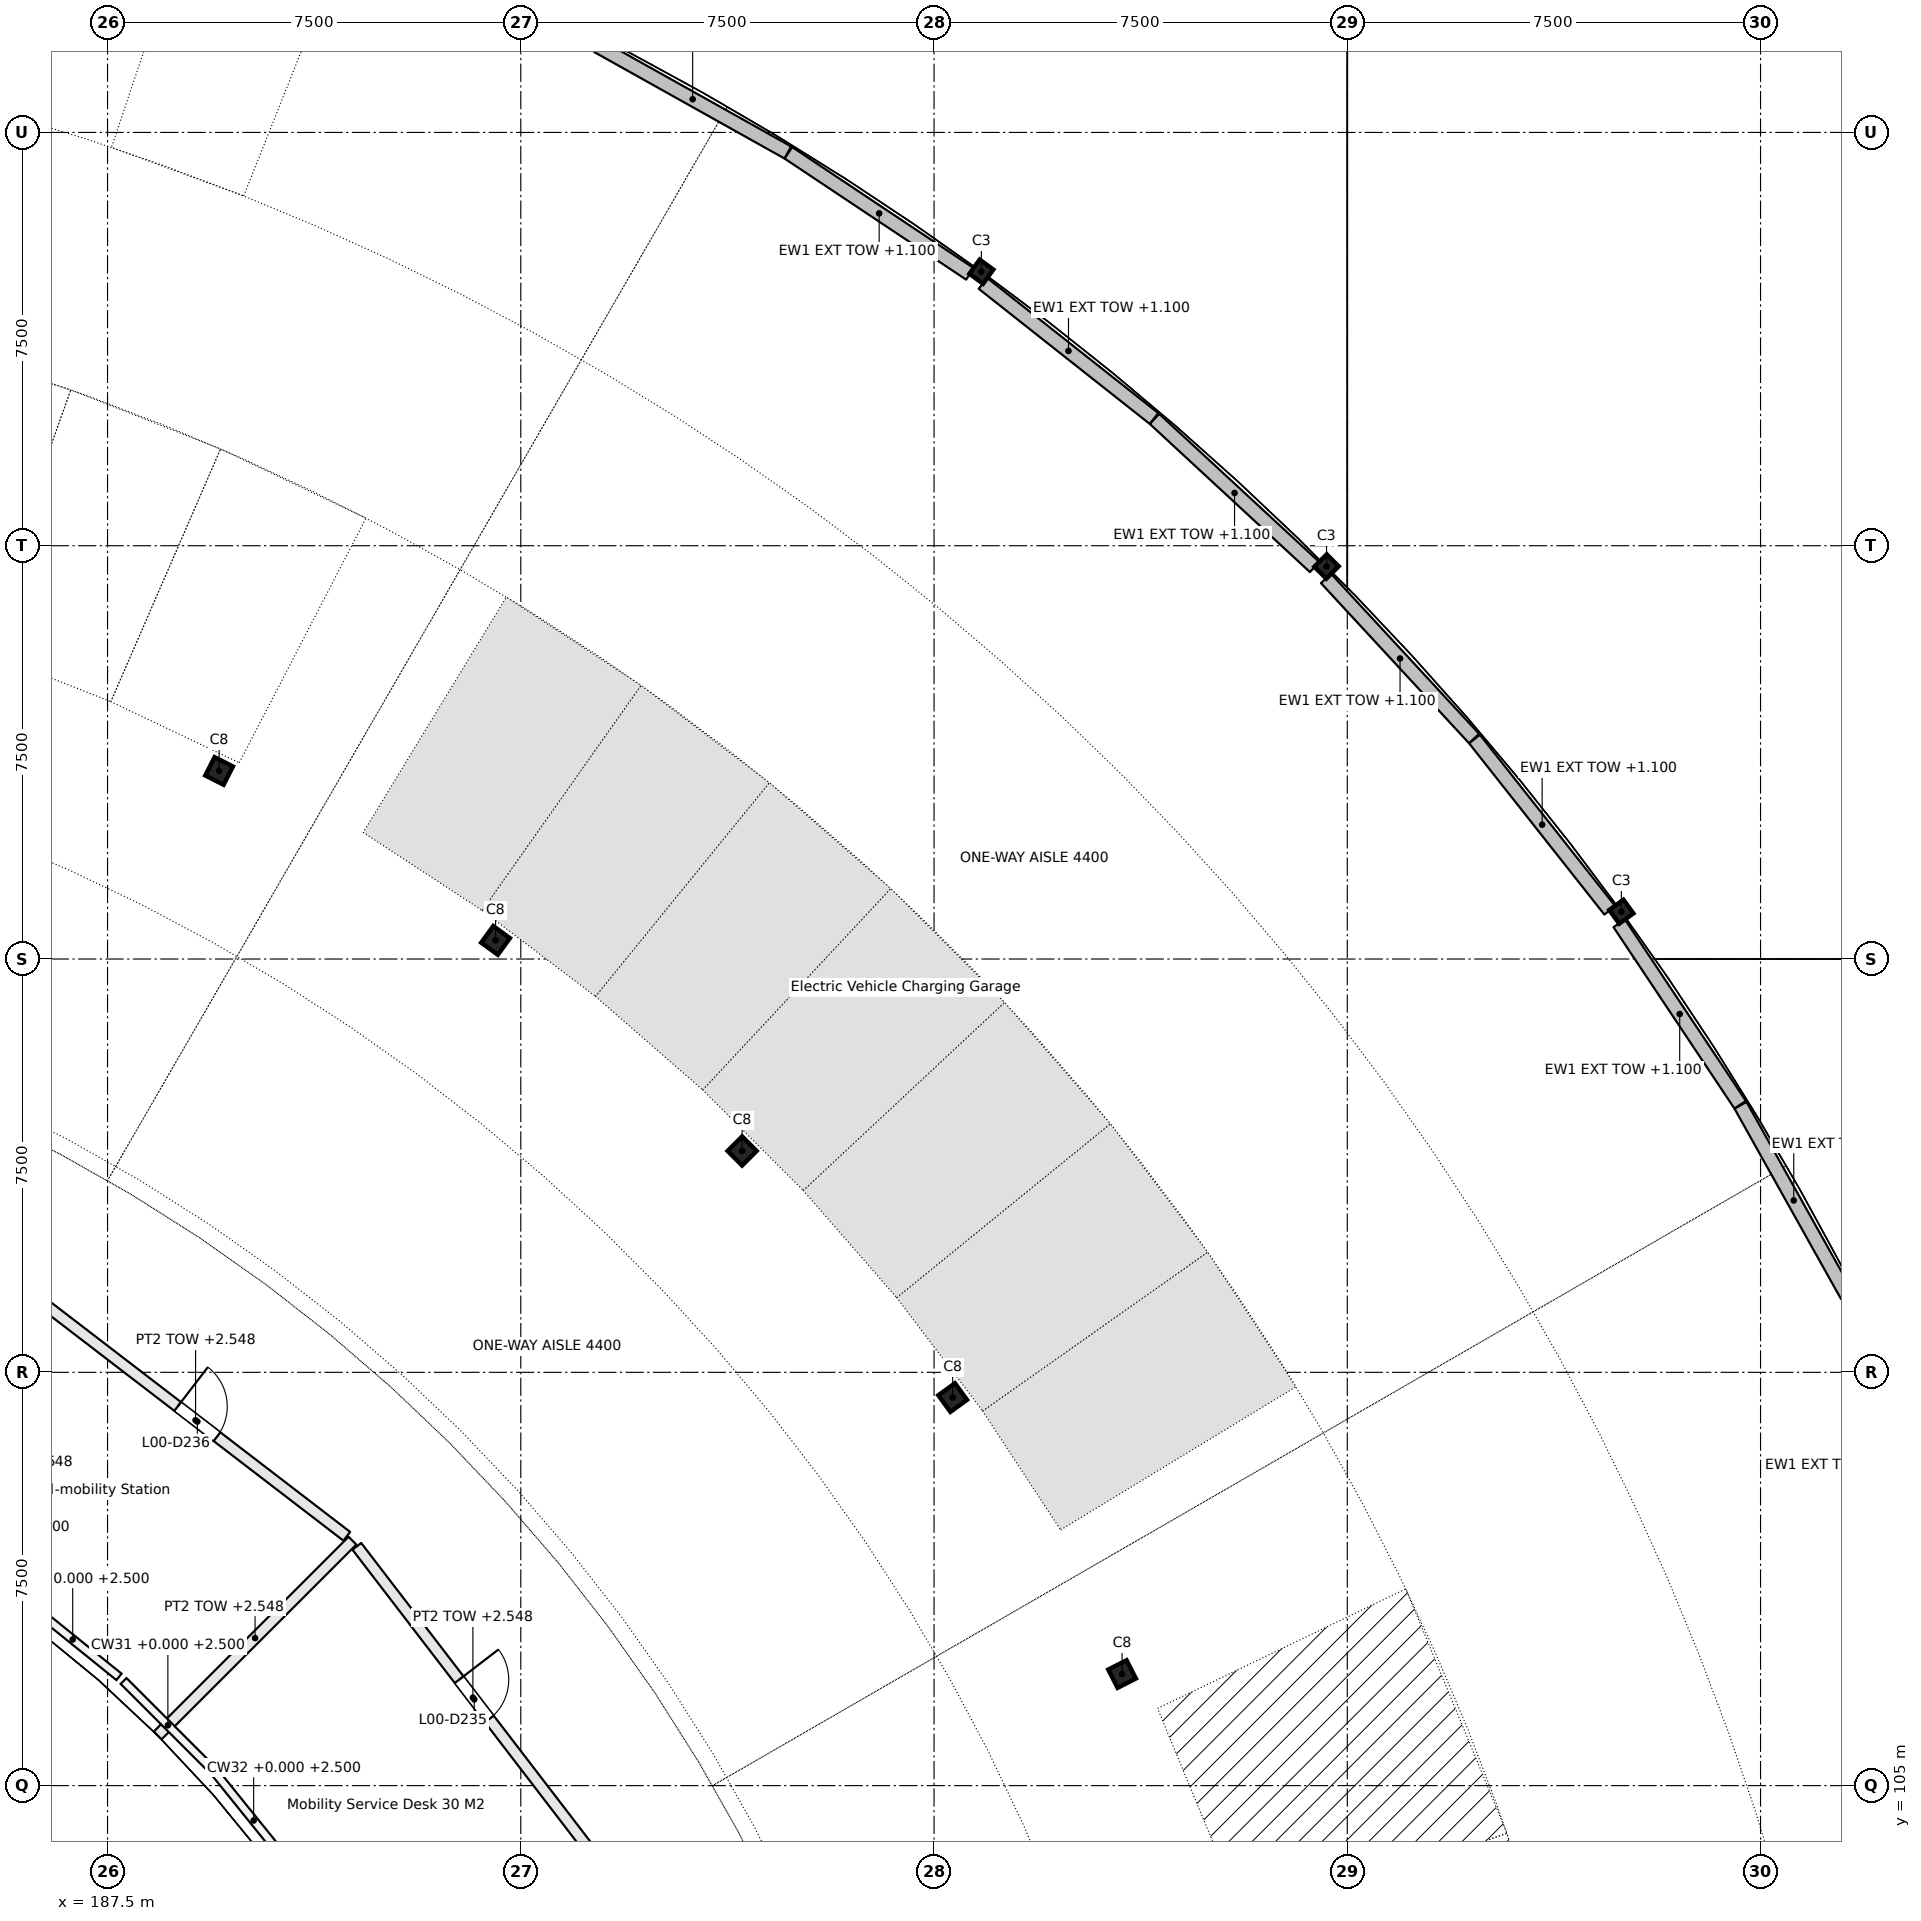
"""IFC4 building model, lengths in metres.
Left out: names, types, materials, properties, quantities, classifications, styles, units other than length and angle.
Written with IfcOpenShell. Run it as: python <this file> out.ifc"""

import sys

from ifc_helpers import new_model, si_unit, direction, frame, frame_2d, origin, origin_2d, place, context, subcontext, project, spatial, rectangle, i_section, extrude, element, fill, save


model = new_model("IFC4")
c1 = context("Model", 3, precision=1e-05, world=origin(), true_north=direction((0.0, 1.0)))
c2 = subcontext(c1, "Body", "Model", "MODEL_VIEW")
j1 = project(units=[si_unit("LENGTHUNIT", "METRE"), si_unit("PLANEANGLEUNIT", "RADIAN")], contexts=[c1])
p1 = place(None, origin())
s1 = spatial("IfcSite", under=j1, at=p1, CompositionType="ELEMENT")
p2 = place(p1, origin())
s2 = spatial("IfcBuilding", under=s1, at=p2, CompositionType="ELEMENT")
p3 = place(p2, origin())
s3 = spatial("IfcBuildingStorey", under=s2, at=p3, CompositionType="ELEMENT", Elevation=0.0)
for number, where, z_axis, x_axis in (
    (1, (189.525, 123.413, -0.25), (0.0, 0.0, 1.0), (-0.891, 0.454, 0.0)),
    (2, (194.542, 120.338, -0.25), (0.0, 0.0, 1.0), (-0.809, 0.588, 0.0)),
    (3, (199.017, 116.517, -0.25), (0.0, 0.0, 1.0), (-0.707, 0.707, 0.0)),
    (4, (202.838, 112.042, -0.25), (0.0, 0.0, 1.0), (-0.588, 0.809, 0.0)),
    (5, (205.913, 107.025, -0.25), (0.0, 0.0, 1.0), (-0.454, 0.891, 0.0)),
):
    element("IfcColumn", number, at=place(p3, frame(where, z_axis=z_axis, x_axis=x_axis)), inside=s3, PredefinedType="COLUMN", context=c2, shape_type="SweptSolid", body=[
        extrude(i_section(OverallWidth=0.373, OverallDepth=0.373, WebThickness=0.016, FlangeThickness=0.026, FilletRadius=0.015, at=origin_2d()), origin(), (0.0, 0.0, 1.0), 3.55),
    ])
for number, where, z_axis, x_axis in (
    (6, (203.359, 132.473, -0.25), (0.0, 0.0, 1.0), (-0.809, 0.588, 0.0)),
    (7, (209.623, 127.123, -0.25), (0.0, 0.0, 1.0), (-0.707, 0.707, 0.0)),
    (8, (214.973, 120.859, -0.25), (0.0, 0.0, 1.0), (-0.588, 0.809, 0.0)),
):
    element("IfcColumn", number, at=place(p3, frame(where, z_axis=z_axis, x_axis=x_axis)), inside=s3, PredefinedType="COLUMN", context=c2, shape_type="SweptSolid", body=[
        extrude(i_section(OverallWidth=0.307, OverallDepth=0.318, WebThickness=0.013, FlangeThickness=0.021, FilletRadius=0.015, at=origin_2d()), origin(), (0.0, 0.0, 1.0), 3.55),
    ])
p4 = place(p3, frame((186.353, 113.737, 0.0), z_axis=(0.0, 0.0, 1.0), x_axis=(0.793285942034, -0.608849254061, 0.0)))
e9 = element("IfcWall", 9, at=p4, inside=s3, PredefinedType="PARTITIONING", context=c2, shape_type="SweptSolid", body=[
    extrude(rectangle(XDim=6.919, YDim=0.2, at=frame_2d((3.459, 0.0))), origin(), (0.0, 0.0, 1.0), 2.548),
])
p5 = place(p4, frame((3.05, 0.0, 0.0)))
e10 = element("IfcOpeningElement", 10, at=p5, cuts=e9, PredefinedType="OPENING", context=c2, shape_type="SweptSolid", body=[
    extrude(rectangle(XDim=0.9, YDim=2.1, at=frame_2d((0.45, 1.05))), frame((0.0, 0.11, 0.0), z_axis=(0.0, -1.0, 0.0), x_axis=(1.0, 0.0, 0.0)), (0.0, 0.0, 1.0), 0.22),
])
p6 = place(p3, frame((188.41, 105.91, 0.0), z_axis=(0.0, 0.0, 1.0), x_axis=(0.707106781187, 0.707106781187, 0.0)))
e11 = element("IfcWall", 11, at=p6, inside=s3, PredefinedType="PARTITIONING", context=c2, shape_type="SweptSolid", body=[
    extrude(rectangle(XDim=5.0, YDim=0.2, at=frame_2d((2.5, 0.0))), origin(), (0.0, 0.0, 1.0), 2.548),
])
p7 = place(p3, frame((192.024, 109.342, 0.0), z_axis=(0.0, 0.0, 1.0), x_axis=(0.608849254061, -0.793285942034, 0.0)))
e12 = element("IfcWall", 12, at=p7, inside=s3, PredefinedType="PARTITIONING", context=c2, shape_type="SweptSolid", body=[
    extrude(rectangle(XDim=6.919, YDim=0.2, at=frame_2d((3.459, 0.0))), origin(), (0.0, 0.0, 1.0), 2.548),
])
p8 = place(p7, frame((3.05, 0.0, 0.0)))
e13 = element("IfcOpeningElement", 13, at=p8, cuts=e12, PredefinedType="OPENING", context=c2, shape_type="SweptSolid", body=[
    extrude(rectangle(XDim=0.9, YDim=2.1, at=frame_2d((0.45, 1.05))), frame((0.0, 0.11, 0.0), z_axis=(0.0, -1.0, 0.0), x_axis=(1.0, 0.0, 0.0)), (0.0, 0.0, 1.0), 0.22),
])
p9 = place(p3, frame((219.069, 113.893, 0.0), z_axis=(0.0, 0.0, 1.0), x_axis=(-0.488359134006, 0.872642742612, 0.0)))
e14 = element("IfcWall", 14, at=p9, inside=s3, PredefinedType="SOLIDWALL", context=c2, shape_type="SweptSolid", body=[
    extrude(rectangle(XDim=3.957, YDim=0.25, at=frame_2d((1.979, 0.0))), origin(), (0.0, 0.0, 1.0), 1.1),
])
p10 = place(p3, frame((217.13, 117.356, 0.0), z_axis=(0.0, 0.0, 1.0), x_axis=(-0.554700196225, 0.832050294338, 0.0)))
e15 = element("IfcWall", 15, at=p10, inside=s3, PredefinedType="SOLIDWALL", context=c2, shape_type="SweptSolid", body=[
    extrude(rectangle(XDim=3.956, YDim=0.25, at=frame_2d((1.978, 0.0))), origin(), (0.0, 0.0, 1.0), 1.1),
])
p11 = place(p3, frame((214.763, 120.885, 0.0), z_axis=(0.0, 0.0, 1.0), x_axis=(-0.619856157671, 0.784715454032, 0.0)))
e16 = element("IfcWall", 16, at=p11, inside=s3, PredefinedType="SOLIDWALL", context=c2, shape_type="SweptSolid", body=[
    extrude(rectangle(XDim=3.96, YDim=0.25, at=frame_2d((1.98, 0.0))), origin(), (0.0, 0.0, 1.0), 1.1),
])
for number, where, z_axis, x_axis in (
    (17, (212.301, 124.001, 0.0), (0.0, 0.0, 1.0), (-0.679, 0.734, 0.0)),
    (18, (209.406, 127.114, 0.0), (0.0, 0.0, 1.0), (-0.734, 0.679, 0.0)),
):
    element("IfcWall", number, at=place(p3, frame(where, z_axis=z_axis, x_axis=x_axis)), inside=s3, PredefinedType="SOLIDWALL", context=c2, shape_type="SweptSolid", body=[
        extrude(rectangle(XDim=3.958, YDim=0.25, at=frame_2d((1.979, 0.0))), origin(), (0.0, 0.0, 1.0), 1.1),
    ])
p12 = place(p3, frame((206.492, 129.809, 0.0), z_axis=(0.0, 0.0, 1.0), x_axis=(-0.784713689724, 0.619858391215, 0.0)))
e19 = element("IfcWall", 19, at=p12, inside=s3, PredefinedType="SOLIDWALL", context=c2, shape_type="SweptSolid", body=[
    extrude(rectangle(XDim=3.956, YDim=0.25, at=frame_2d((1.978, 0.0))), origin(), (0.0, 0.0, 1.0), 1.1),
])
p13 = place(p3, frame((203.151, 132.433, 0.0), z_axis=(0.0, 0.0, 1.0), x_axis=(-0.832031324554, 0.554728649847, 0.0)))
e20 = element("IfcWall", 20, at=p13, inside=s3, PredefinedType="SOLIDWALL", context=c2, shape_type="SweptSolid", body=[
    extrude(rectangle(XDim=3.96, YDim=0.25, at=frame_2d((1.98, 0.0))), origin(), (0.0, 0.0, 1.0), 1.1),
])
p14 = place(p3, frame((199.846, 134.636, 0.0), z_axis=(0.0, 0.0, 1.0), x_axis=(-0.872642742612, 0.488359134006, 0.0)))
e21 = element("IfcWall", 21, at=p14, inside=s3, PredefinedType="SOLIDWALL", context=c2, shape_type="SweptSolid", body=[
    extrude(rectangle(XDim=3.957, YDim=0.25, at=frame_2d((1.979, 0.0))), origin(), (0.0, 0.0, 1.0), 1.1),
])
p15 = place(p8, origin())
e22 = element("IfcDoor", 22, at=p15, inside=s3, OperationType="SINGLE_SWING_RIGHT", PredefinedType="DOOR", context=c2, shape_type="SweptSolid", body=[
    extrude(rectangle(XDim=0.9, YDim=2.1, at=frame_2d((0.45, 1.05))), frame((0.0, 0.025, 0.0), z_axis=(0.0, -1.0, 0.0), x_axis=(1.0, 0.0, 0.0)), (0.0, 0.0, 1.0), 0.05),
])
fill(e13, e22)
p16 = place(p5, origin())
e23 = element("IfcDoor", 23, at=p16, inside=s3, OperationType="SINGLE_SWING_RIGHT", PredefinedType="DOOR", context=c2, shape_type="SweptSolid", body=[
    extrude(rectangle(XDim=0.9, YDim=2.1, at=frame_2d((0.45, 1.05))), frame((0.0, 0.025, 0.0), z_axis=(0.0, -1.0, 0.0), x_axis=(1.0, 0.0, 0.0)), (0.0, 0.0, 1.0), 0.05),
])
fill(e10, e23)
save(model, sys.argv[1])
